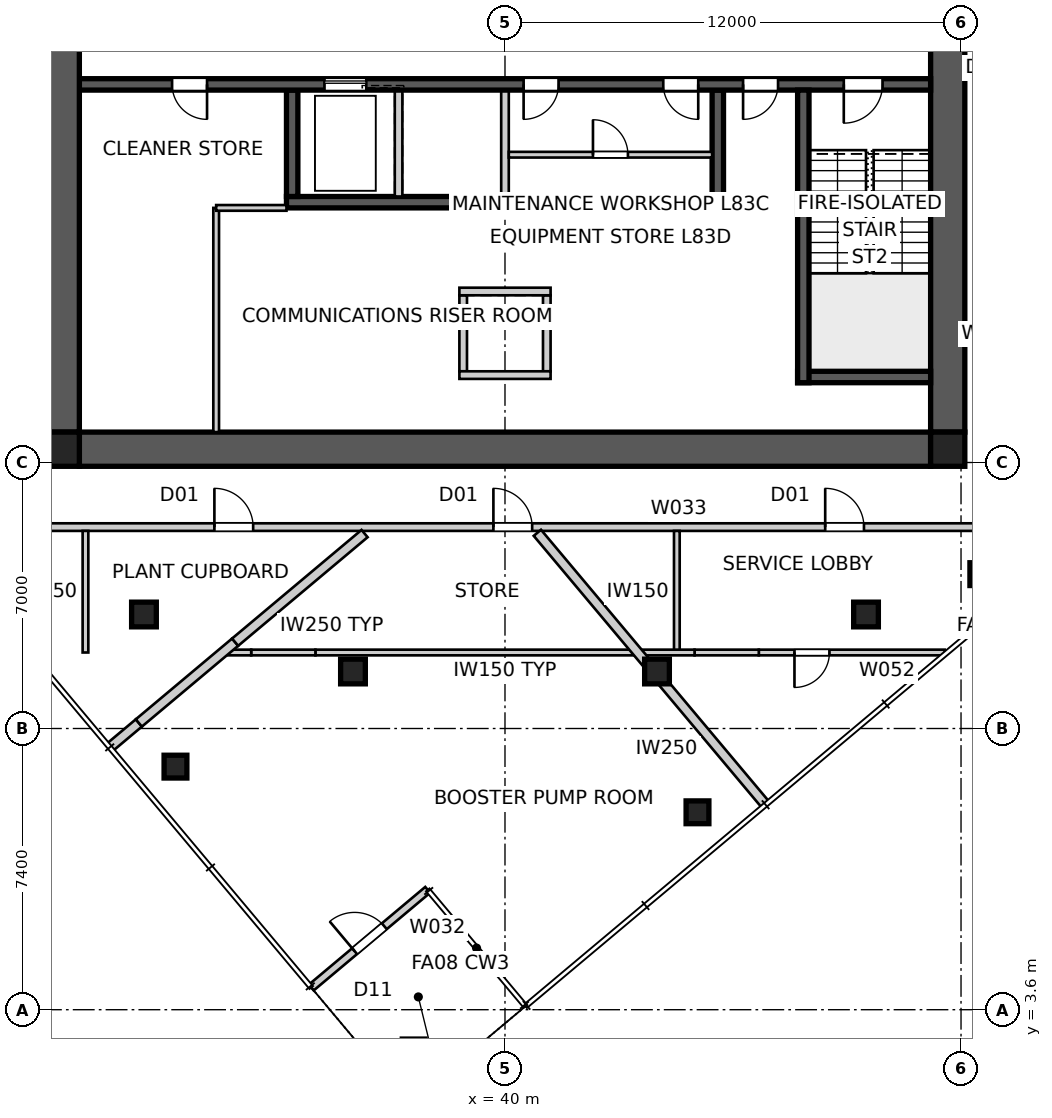
"""IFC4 building model, lengths in metres.
Left out: names, types, materials, properties, quantities, classifications, styles, units other than length and angle.
Written with IfcOpenShell. Run it as: python <this file> out.ifc"""

import sys

from ifc_helpers import new_model, si_unit, direction, frame, frame_2d, origin, origin_2d, place, context, subcontext, project, spatial, polyline, rectangle, outline, extrude, element, fill, save


model = new_model("IFC4")
c1 = context("Model", 3, precision=1e-05, world=origin(), true_north=direction((0.0, 1.0)))
c2 = subcontext(c1, "Body", "Model", "MODEL_VIEW")
j1 = project(units=[si_unit("LENGTHUNIT", "METRE"), si_unit("PLANEANGLEUNIT", "RADIAN")], contexts=[c1])
p1 = place(None, origin())
s1 = spatial("IfcSite", under=j1, at=p1, CompositionType="ELEMENT")
p2 = place(p1, origin())
s2 = spatial("IfcBuilding", under=s1, at=p2, CompositionType="ELEMENT")
p3 = place(p2, frame((0.0, 0.0, 299.8)))
s3 = spatial("IfcBuildingStorey", under=s2, at=p3, CompositionType="ELEMENT", Elevation=299.8)
p4 = place(p3, frame((51.2, 18.35, 0.0), z_axis=(0.0, 0.0, 1.0), x_axis=(-1.0, 0.0, 0.0)))
e1 = element("IfcWall", 1, at=p4, inside=s3, PredefinedType="SHEAR", context=c2, shape_type="SweptSolid", body=[
    extrude(outline(polyline([(0.0, -0.45), (22.4, -0.45), (22.4, -0.025), (22.85, -0.025), (22.85, 0.025), (22.4, 0.025), (22.4, 0.45), (0.0, 0.45), (0.0, 0.025), (-0.45, 0.025), (-0.45, -0.025), (0.0, -0.025), (0.0, -0.45)])), origin(), (0.0, 0.0, 1.0), 4.5),
])
p5 = place(p3, frame((51.65, 18.8, 0.0), z_axis=(0.0, 0.0, 1.0), x_axis=(0.0, 1.0, 0.0)))
e2 = element("IfcWall", 2, at=p5, inside=s3, PredefinedType="SHEAR", context=c2, shape_type="SweptSolid", body=[
    extrude(outline(polyline([(0.0, -0.45), (22.4, -0.45), (22.4, -0.025), (22.85, -0.025), (22.85, 0.025), (22.4, 0.025), (22.4, 0.45), (0.0, 0.45), (0.0, 0.025), (-0.45, 0.025), (-0.45, -0.025), (0.0, -0.025), (0.0, -0.45)])), origin(), (0.0, 0.0, 1.0), 4.5),
])
p6 = place(p5, frame((11.14, 0.0, 0.0)))
e3 = element("IfcOpeningElement", 3, at=p6, cuts=e2, PredefinedType="OPENING", context=c2, shape_type="SweptSolid", body=[
    extrude(rectangle(XDim=1.02, YDim=2.4, at=frame_2d((0.51, 1.2))), frame((0.0, 0.46, 0.0), z_axis=(0.0, -1.0, 0.0), x_axis=(1.0, 0.0, 0.0)), (0.0, 0.0, 1.0), 0.92),
])
p7 = place(p3, frame((28.35, 41.2, 0.0), z_axis=(0.0, 0.0, 1.0), x_axis=(0.0, -1.0, 0.0)))
e4 = element("IfcWall", 4, at=p7, inside=s3, PredefinedType="SHEAR", context=c2, shape_type="SweptSolid", body=[
    extrude(outline(polyline([(0.0, -0.45), (22.4, -0.45), (22.4, -0.025), (22.85, -0.025), (22.85, 0.025), (22.4, 0.025), (22.4, 0.45), (0.0, 0.45), (0.0, 0.025), (-0.45, 0.025), (-0.45, -0.025), (0.0, -0.025), (0.0, -0.45)])), origin(), (0.0, 0.0, 1.0), 4.5),
])
p8 = place(p7, frame((11.14, 0.0, 0.0)))
e5 = element("IfcOpeningElement", 5, at=p8, cuts=e4, PredefinedType="OPENING", context=c2, shape_type="SweptSolid", body=[
    extrude(rectangle(XDim=1.02, YDim=2.4, at=frame_2d((0.51, 1.2))), frame((0.0, 0.46, 0.0), z_axis=(0.0, -1.0, 0.0), x_axis=(1.0, 0.0, 0.0)), (0.0, 0.0, 1.0), 0.92),
])
p9 = place(p3, frame((51.2, 27.95, 0.0), z_axis=(0.0, 0.0, 1.0), x_axis=(-1.0, 0.0, 0.0)))
e6 = element("IfcWall", 6, at=p9, inside=s3, PredefinedType="SHEAR", context=c2, shape_type="SweptSolid", body=[
    extrude(rectangle(XDim=22.4, YDim=0.3, at=frame_2d((11.2, 0.0))), origin(), (0.0, 0.0, 1.0), 4.5),
])
p10 = place(p9, frame((19.04, 0.0, 0.0)))
e7 = element("IfcOpeningElement", 7, at=p10, cuts=e6, PredefinedType="OPENING", context=c2, shape_type="SweptSolid", body=[
    extrude(rectangle(XDim=0.92, YDim=2.1, at=frame_2d((0.46, 1.05))), frame((0.0, 0.16, 0.0), z_axis=(0.0, -1.0, 0.0), x_axis=(1.0, 0.0, 0.0)), (0.0, 0.0, 1.0), 0.32),
])
p11 = place(p9, frame((1.265, 0.0, 0.0)))
e8 = element("IfcOpeningElement", 8, at=p11, cuts=e6, PredefinedType="OPENING", context=c2, shape_type="SweptSolid", body=[
    extrude(rectangle(XDim=1.02, YDim=2.1, at=frame_2d((0.51, 1.05))), frame((0.0, 0.16, 0.0), z_axis=(0.0, -1.0, 0.0), x_axis=(1.0, 0.0, 0.0)), (0.0, 0.0, 1.0), 0.32),
])
p12 = place(p9, frame((4.015, 0.0, 0.0)))
e9 = element("IfcOpeningElement", 9, at=p12, cuts=e6, PredefinedType="OPENING", context=c2, shape_type="SweptSolid", body=[
    extrude(rectangle(XDim=0.92, YDim=2.1, at=frame_2d((0.46, 1.05))), frame((0.0, 0.16, 0.0), z_axis=(0.0, -1.0, 0.0), x_axis=(1.0, 0.0, 0.0)), (0.0, 0.0, 1.0), 0.32),
])
p13 = place(p9, frame((9.79, 0.0, 0.0)))
e10 = element("IfcOpeningElement", 10, at=p13, cuts=e6, PredefinedType="OPENING", context=c2, shape_type="SweptSolid", body=[
    extrude(rectangle(XDim=0.92, YDim=2.1, at=frame_2d((0.46, 1.05))), frame((0.0, 0.16, 0.0), z_axis=(0.0, -1.0, 0.0), x_axis=(1.0, 0.0, 0.0)), (0.0, 0.0, 1.0), 0.32),
])
p14 = place(p9, frame((6.115, 0.0, 0.0)))
e11 = element("IfcOpeningElement", 11, at=p14, cuts=e6, PredefinedType="OPENING", context=c2, shape_type="SweptSolid", body=[
    extrude(rectangle(XDim=0.92, YDim=2.1, at=frame_2d((0.46, 1.05))), frame((0.0, 0.16, 0.0), z_axis=(0.0, -1.0, 0.0), x_axis=(1.0, 0.0, 0.0)), (0.0, 0.0, 1.0), 0.32),
])
p15 = place(p9, frame((14.85, 0.0, 0.0)))
e12 = element("IfcOpeningElement", 12, at=p15, cuts=e6, PredefinedType="OPENING", context=c2, shape_type="SweptSolid", body=[
    extrude(rectangle(XDim=1.1, YDim=2.1, at=frame_2d((0.55, 1.05))), frame((0.0, 0.16, 0.0), z_axis=(0.0, -1.0, 0.0), x_axis=(1.0, 0.0, 0.0)), (0.0, 0.0, 1.0), 0.32),
])
p16 = place(p3, frame((45.75, 24.85, 0.0), z_axis=(0.0, 0.0, 1.0), x_axis=(-1.0, 0.0, 0.0)))
e13 = element("IfcWall", 13, at=p16, inside=s3, PredefinedType="SHEAR", context=c2, shape_type="SweptSolid", body=[
    extrude(rectangle(XDim=11.5, YDim=0.3, at=frame_2d((5.75, 0.0))), origin(), (0.0, 0.0, 1.0), 4.5),
])
p17 = place(p3, frame((45.6, 27.8, 0.0), z_axis=(0.0, 0.0, 1.0), x_axis=(0.0, -1.0, 0.0)))
e14 = element("IfcWall", 14, at=p17, inside=s3, PredefinedType="SHEAR", context=c2, shape_type="SweptSolid", body=[
    extrude(rectangle(XDim=2.8, YDim=0.3, at=frame_2d((1.4, 0.0))), origin(), (0.0, 0.0, 1.0), 4.5),
])
for number, where, z_axis, x_axis in (
    (15, (40.0, 27.8, 0.0), (0.0, 0.0, 1.0), (0.0, -1.0, 0.0)),
    (16, (37.2, 27.8, 0.0), (0.0, 0.0, 1.0), (0.0, -1.0, 0.0)),
):
    element("IfcWall", number, at=place(p3, frame(where, z_axis=z_axis, x_axis=x_axis)), inside=s3, PredefinedType="SOLIDWALL", context=c2, shape_type="SweptSolid", body=[
        extrude(rectangle(XDim=2.8, YDim=0.2, at=frame_2d((1.4, 0.0))), origin(), (0.0, 0.0, 1.0), 4.5),
    ])
p18 = place(p3, frame((34.4, 27.8, 0.0), z_axis=(0.0, 0.0, 1.0), x_axis=(0.0, -1.0, 0.0)))
e17 = element("IfcWall", 17, at=p18, inside=s3, PredefinedType="SHEAR", context=c2, shape_type="SweptSolid", body=[
    extrude(rectangle(XDim=2.8, YDim=0.3, at=frame_2d((1.4, 0.0))), origin(), (0.0, 0.0, 1.0), 4.5),
])
p19 = place(p3, frame((47.85, 27.8, 0.0), z_axis=(0.0, 0.0, 1.0), x_axis=(0.0, -1.0, 0.0)))
e18 = element("IfcWall", 18, at=p19, inside=s3, PredefinedType="SHEAR", context=c2, shape_type="SweptSolid", body=[
    extrude(rectangle(XDim=7.7, YDim=0.3, at=frame_2d((3.85, 0.0))), origin(), (0.0, 0.0, 1.0), 4.5),
])
p20 = place(p3, frame((51.2, 20.25, 0.0), z_axis=(0.0, 0.0, 1.0), x_axis=(-1.0, 0.0, 0.0)))
e19 = element("IfcWall", 19, at=p20, inside=s3, PredefinedType="SHEAR", context=c2, shape_type="SweptSolid", body=[
    extrude(rectangle(XDim=3.5, YDim=0.3, at=frame_2d((1.75, 0.0))), origin(), (0.0, 0.0, 1.0), 4.5),
])
for number, where, z_axis, x_axis in (
    (20, (38.9, 22.4, 0.0), (0.0, 0.0, 1.0), (0.0, -1.0, 0.0)),
    (21, (41.1, 22.4, 0.0), (0.0, 0.0, 1.0), (0.0, -1.0, 0.0)),
):
    element("IfcWall", number, at=place(p3, frame(where, z_axis=z_axis, x_axis=x_axis)), inside=s3, PredefinedType="SOLIDWALL", context=c2, shape_type="SweptSolid", body=[
        extrude(rectangle(XDim=2.0, YDim=0.2, at=frame_2d((1.0, 0.0))), origin(), (0.0, 0.0, 1.0), 4.5),
    ])
for number, where, z_axis, x_axis in (
    (22, (38.8, 22.5, 0.0), (0.0, 0.0, 1.0), (1.0, 0.0, 0.0)),
    (23, (38.8, 20.3, 0.0), (0.0, 0.0, 1.0), (1.0, 0.0, 0.0)),
):
    element("IfcWall", number, at=place(p3, frame(where, z_axis=z_axis, x_axis=x_axis)), inside=s3, PredefinedType="SOLIDWALL", context=c2, shape_type="SweptSolid", body=[
        extrude(rectangle(XDim=2.4, YDim=0.2, at=frame_2d((1.2, 0.0))), origin(), (0.0, 0.0, 1.0), 4.5),
    ])
for number, where, z_axis, x_axis in (
    (24, (28.35, 18.35, 0.0), (0.0, 0.0, 1.0), (1.0, 0.0, 0.0)),
    (25, (51.65, 18.35, 0.0), (0.0, 0.0, 1.0), (1.0, 0.0, 0.0)),
):
    element("IfcColumn", number, at=place(p3, frame(where, z_axis=z_axis, x_axis=x_axis)), inside=s3, PredefinedType="COLUMN", context=c2, shape_type="SweptSolid", body=[
        extrude(rectangle(XDim=0.9, YDim=0.9, at=origin_2d()), origin(), (0.0, 0.0, 1.0), 4.5),
    ])
for number, where, z_axis, x_axis in (
    (26, (45.065, 8.795, 0.0), (0.0, 0.0, 1.0), (1.0, 0.0, 0.0)),
    (27, (52.534, 15.062, 0.0), (0.0, 0.0, 1.0), (1.0, 0.0, 0.0)),
    (28, (31.329, 9.997, 0.0), (0.0, 0.0, 1.0), (1.0, 0.0, 0.0)),
):
    element("IfcColumn", number, at=place(p3, frame(where, z_axis=z_axis, x_axis=x_axis)), inside=s3, PredefinedType="COLUMN", context=c2, shape_type="SweptSolid", body=[
        extrude(rectangle(XDim=0.6, YDim=0.6, at=origin_2d()), origin(), (0.0, 0.0, 1.0), 4.5),
    ])
for number, where, z_axis, x_axis in (
    (29, (30.5, 14.0, 0.0), (0.0, 0.0, 1.0), (1.0, 0.0, 0.0)),
    (30, (36.0, 12.5, 0.0), (0.0, 0.0, 1.0), (1.0, 0.0, 0.0)),
    (31, (44.0, 12.5, 0.0), (0.0, 0.0, 1.0), (1.0, 0.0, 0.0)),
    (32, (49.5, 14.0, 0.0), (0.0, 0.0, 1.0), (1.0, 0.0, 0.0)),
):
    element("IfcColumn", number, at=place(p3, frame(where, z_axis=z_axis, x_axis=x_axis)), inside=s3, PredefinedType="COLUMN", context=c2, shape_type="SweptSolid", body=[
        extrude(rectangle(XDim=0.65, YDim=0.65, at=origin_2d()), origin(), (0.0, 0.0, 1.0), 4.5),
    ])
p21 = place(p3, frame((34.902, 4.183, 0.0), z_axis=(0.0, 0.0, 1.0), x_axis=(0.766060656284, 0.642768287094, 0.0)))
e33 = element("IfcWall", 33, at=p21, inside=s3, PredefinedType="SOLIDWALL", context=c2, shape_type="SweptSolid", body=[
    extrude(rectangle(XDim=4.0, YDim=0.2, at=frame_2d((2.0, 0.0))), origin(), (0.0, 0.0, 1.0), 4.3),
])
p22 = place(p21, frame((1.49, 0.0, 0.0)))
e34 = element("IfcOpeningElement", 34, at=p22, cuts=e33, PredefinedType="OPENING", context=c2, shape_type="SweptSolid", body=[
    extrude(rectangle(XDim=1.02, YDim=2.1, at=frame_2d((0.51, 1.05))), frame((0.0, 0.11, 0.0), z_axis=(0.0, -1.0, 0.0), x_axis=(1.0, 0.0, 0.0)), (0.0, 0.0, 1.0), 0.22),
])
p23 = place(p3, frame((26.3, 16.3, 0.0), z_axis=(0.0, 0.0, 1.0), x_axis=(1.0, 0.0, 0.0)))
e35 = element("IfcWall", 35, at=p23, inside=s3, PredefinedType="PARTITIONING", context=c2, shape_type="SweptSolid", body=[
    extrude(rectangle(XDim=27.4, YDim=0.2, at=frame_2d((13.7, 0.0))), origin(), (0.0, 0.0, 1.0), 4.3),
])
p24 = place(p23, frame((22.126, 0.0, 0.0)))
e36 = element("IfcOpeningElement", 36, at=p24, cuts=e35, PredefinedType="OPENING", context=c2, shape_type="SweptSolid", body=[
    extrude(rectangle(XDim=1.02, YDim=2.34, at=frame_2d((0.51, 1.17))), frame((0.0, 0.11, 0.0), z_axis=(0.0, -1.0, 0.0), x_axis=(1.0, 0.0, 0.0)), (0.0, 0.0, 1.0), 0.22),
])
p25 = place(p23, frame((13.395, 0.0, 0.0)))
e37 = element("IfcOpeningElement", 37, at=p25, cuts=e35, PredefinedType="OPENING", context=c2, shape_type="SweptSolid", body=[
    extrude(rectangle(XDim=1.02, YDim=2.34, at=frame_2d((0.51, 1.17))), frame((0.0, 0.11, 0.0), z_axis=(0.0, -1.0, 0.0), x_axis=(1.0, 0.0, 0.0)), (0.0, 0.0, 1.0), 0.22),
])
p26 = place(p23, frame((6.053, 0.0, 0.0)))
e38 = element("IfcOpeningElement", 38, at=p26, cuts=e35, PredefinedType="OPENING", context=c2, shape_type="SweptSolid", body=[
    extrude(rectangle(XDim=1.02, YDim=2.34, at=frame_2d((0.51, 1.17))), frame((0.0, 0.11, 0.0), z_axis=(0.0, -1.0, 0.0), x_axis=(1.0, 0.0, 0.0)), (0.0, 0.0, 1.0), 0.22),
])
p27 = place(p3, frame((46.857, 8.993, 0.0), z_axis=(0.0, 0.0, 1.0), x_axis=(-0.64278692291, 0.766045019392, 0.0)))
e39 = element("IfcWall", 39, at=p27, inside=s3, PredefinedType="PARTITIONING", context=c2, shape_type="SweptSolid", body=[
    extrude(rectangle(XDim=9.343, YDim=0.25, at=frame_2d((4.671, 0.0))), origin(), (0.0, 0.0, 1.0), 4.3),
])
p28 = place(p3, frame((29.599, 10.503, 0.0), z_axis=(0.0, 0.0, 1.0), x_axis=(0.766055819685, 0.64277405138, 0.0)))
e40 = element("IfcWall", 40, at=p28, inside=s3, PredefinedType="PARTITIONING", context=c2, shape_type="SweptSolid", body=[
    extrude(rectangle(XDim=1.0, YDim=0.25, at=frame_2d((0.5, 0.0))), origin(), (0.0, 0.0, 1.0), 4.3),
])
p29 = place(p3, frame((30.365, 11.146, 0.0), z_axis=(0.0, 0.0, 1.0), x_axis=(0.766014492995, 0.642823301165, 0.0)))
e41 = element("IfcWall", 41, at=p29, inside=s3, PredefinedType="PARTITIONING", context=c2, shape_type="SweptSolid", body=[
    extrude(rectangle(XDim=3.308, YDim=0.25, at=frame_2d((1.654, 0.0))), origin(), (0.0, 0.0, 1.0), 3.688),
])
p30 = place(p3, frame((32.899, 13.272, 0.0), z_axis=(0.0, 0.0, 1.0), x_axis=(0.766051985436, 0.642778620996, 0.0)))
e42 = element("IfcWall", 42, at=p30, inside=s3, PredefinedType="PARTITIONING", context=c2, shape_type="SweptSolid", body=[
    extrude(rectangle(XDim=4.446, YDim=0.25, at=frame_2d((2.223, 0.0))), origin(), (0.0, 0.0, 1.0), 4.3),
])
p31 = place(p3, frame((32.4, 18.8, 0.0), z_axis=(0.0, 0.0, 1.0), x_axis=(0.0, 1.0, 0.0)))
e43 = element("IfcWall", 43, at=p31, inside=s3, PredefinedType="SOLIDWALL", context=c2, shape_type="SweptSolid", body=[
    extrude(rectangle(XDim=5.9, YDim=0.15, at=frame_2d((2.95, 0.0))), origin(), (0.0, 0.0, 1.0), 4.3),
])
p32 = place(p3, frame((32.4, 24.7, 0.0), z_axis=(0.0, 0.0, 1.0), x_axis=(1.0, 0.0, 0.0)))
e44 = element("IfcWall", 44, at=p32, inside=s3, PredefinedType="SOLIDWALL", context=c2, shape_type="SweptSolid", body=[
    extrude(rectangle(XDim=1.85, YDim=0.15, at=frame_2d((0.925, 0.0))), origin(), (0.0, 0.0, 1.0), 4.3),
])
for number, where, z_axis, x_axis in (
    (45, (28.961, 16.2, 0.0), (0.0, 0.0, 1.0), (0.0, -1.0, 0.0)),
    (46, (44.522, 13.0, 0.0), (0.0, 0.0, 1.0), (0.0, 1.0, 0.0)),
):
    element("IfcWall", number, at=place(p3, frame(where, z_axis=z_axis, x_axis=x_axis)), inside=s3, PredefinedType="SOLIDWALL", context=c2, shape_type="SweptSolid", body=[
        extrude(rectangle(XDim=3.2, YDim=0.15, at=frame_2d((1.6, 0.0))), origin(), (0.0, 0.0, 1.0), 4.3),
    ])
p33 = place(p3, frame((51.57, 13.0, 0.0), z_axis=(0.0, 0.0, 1.0), x_axis=(-1.0, 0.0, 0.0)))
e47 = element("IfcWall", 47, at=p33, inside=s3, PredefinedType="SOLIDWALL", context=c2, shape_type="SweptSolid", body=[
    extrude(rectangle(XDim=4.892, YDim=0.15, at=frame_2d((2.446, 0.0))), origin(), (0.0, 0.0, 1.0), 4.3),
])
p34 = place(p33, frame((3.033, 0.0, 0.0)))
e48 = element("IfcOpeningElement", 48, at=p34, cuts=e47, PredefinedType="OPENING", context=c2, shape_type="SweptSolid", body=[
    extrude(rectangle(XDim=0.92, YDim=2.1, at=frame_2d((0.46, 1.05))), frame((0.0, 0.085, 0.0), z_axis=(0.0, -1.0, 0.0), x_axis=(1.0, 0.0, 0.0)), (0.0, 0.0, 1.0), 0.17),
])
p35 = place(p3, frame((46.678, 13.0, 0.0), z_axis=(0.0, 0.0, 1.0), x_axis=(-1.0, 0.0, 0.0)))
e49 = element("IfcWall", 49, at=p35, inside=s3, PredefinedType="SOLIDWALL", context=c2, shape_type="SweptSolid", body=[
    extrude(rectangle(XDim=1.69, YDim=0.15, at=frame_2d((0.845, 0.0))), origin(), (0.0, 0.0, 1.0), 3.3),
])
p36 = place(p3, frame((44.988, 13.0, 0.0), z_axis=(0.0, 0.0, 1.0), x_axis=(-1.0, 0.0, 0.0)))
e50 = element("IfcWall", 50, at=p36, inside=s3, PredefinedType="SOLIDWALL", context=c2, shape_type="SweptSolid", body=[
    extrude(rectangle(XDim=9.977, YDim=0.15, at=frame_2d((4.988, 0.0))), origin(), (0.0, 0.0, 1.0), 4.3),
])
p37 = place(p3, frame((35.012, 13.0, 0.0), z_axis=(0.0, 0.0, 1.0), x_axis=(-1.0, 0.0, 0.0)))
e51 = element("IfcWall", 51, at=p37, inside=s3, PredefinedType="SOLIDWALL", context=c2, shape_type="SweptSolid", body=[
    extrude(rectangle(XDim=1.69, YDim=0.15, at=frame_2d((0.845, 0.0))), origin(), (0.0, 0.0, 1.0), 3.3),
])
p38 = place(p3, frame((33.322, 13.0, 0.0), z_axis=(0.0, 0.0, 1.0), x_axis=(-1.0, 0.0, 0.0)))
e52 = element("IfcWall", 52, at=p38, inside=s3, PredefinedType="SOLIDWALL", context=c2, shape_type="SweptSolid", body=[
    extrude(rectangle(XDim=0.747, YDim=0.15, at=frame_2d((0.373, 0.0))), origin(), (0.0, 0.0, 1.0), 4.3),
])
p39 = place(p3, frame((40.1, 26.1, 0.0), z_axis=(0.0, 0.0, 1.0), x_axis=(1.0, 0.0, 0.0)))
e53 = element("IfcWall", 53, at=p39, inside=s3, PredefinedType="SOLIDWALL", context=c2, shape_type="SweptSolid", body=[
    extrude(rectangle(XDim=5.35, YDim=0.15, at=frame_2d((2.675, 0.0))), origin(), (0.0, 0.0, 1.0), 4.3),
])
p40 = place(p39, frame((2.215, 0.0, 0.0)))
e54 = element("IfcOpeningElement", 54, at=p40, cuts=e53, PredefinedType="OPENING", context=c2, shape_type="SweptSolid", body=[
    extrude(rectangle(XDim=0.92, YDim=2.1, at=frame_2d((0.46, 1.05))), frame((0.0, 0.085, 0.0), z_axis=(0.0, -1.0, 0.0), x_axis=(1.0, 0.0, 0.0)), (0.0, 0.0, 1.0), 0.17),
])
p41 = place(p22, origin())
e55 = element("IfcDoor", 55, at=p41, inside=s3, OperationType="SINGLE_SWING_LEFT", PredefinedType="DOOR", context=c2, shape_type="SweptSolid", body=[
    extrude(rectangle(XDim=1.02, YDim=2.1, at=frame_2d((0.51, 1.05))), frame((0.0, 0.025, 0.0), z_axis=(0.0, -1.0, 0.0), x_axis=(1.0, 0.0, 0.0)), (0.0, 0.0, 1.0), 0.05),
])
fill(e34, e55)
p42 = place(p10, origin())
e56 = element("IfcDoor", 56, at=p42, inside=s3, OperationType="SINGLE_SWING_LEFT", PredefinedType="DOOR", context=c2, shape_type="SweptSolid", body=[
    extrude(rectangle(XDim=0.92, YDim=2.1, at=frame_2d((0.46, 1.05))), frame((0.0, 0.025, 0.0), z_axis=(0.0, -1.0, 0.0), x_axis=(1.0, 0.0, 0.0)), (0.0, 0.0, 1.0), 0.05),
])
fill(e7, e56)
p43 = place(p11, origin())
e57 = element("IfcDoor", 57, at=p43, inside=s3, OperationType="SINGLE_SWING_RIGHT", PredefinedType="DOOR", context=c2, shape_type="SweptSolid", body=[
    extrude(rectangle(XDim=1.02, YDim=2.1, at=frame_2d((0.51, 1.05))), frame((0.0, 0.025, 0.0), z_axis=(0.0, -1.0, 0.0), x_axis=(1.0, 0.0, 0.0)), (0.0, 0.0, 1.0), 0.05),
])
fill(e8, e57)
p44 = place(p12, origin())
e58 = element("IfcDoor", 58, at=p44, inside=s3, OperationType="SINGLE_SWING_RIGHT", PredefinedType="DOOR", context=c2, shape_type="SweptSolid", body=[
    extrude(rectangle(XDim=0.92, YDim=2.1, at=frame_2d((0.46, 1.05))), frame((0.0, 0.025, 0.0), z_axis=(0.0, -1.0, 0.0), x_axis=(1.0, 0.0, 0.0)), (0.0, 0.0, 1.0), 0.05),
])
fill(e9, e58)
p45 = place(p24, origin())
e59 = element("IfcDoor", 59, at=p45, inside=s3, OperationType="SINGLE_SWING_LEFT", PredefinedType="DOOR", context=c2, shape_type="SweptSolid", body=[
    extrude(rectangle(XDim=1.02, YDim=2.34, at=frame_2d((0.51, 1.17))), frame((0.0, 0.025, 0.0), z_axis=(0.0, -1.0, 0.0), x_axis=(1.0, 0.0, 0.0)), (0.0, 0.0, 1.0), 0.05),
])
fill(e36, e59)
p46 = place(p25, origin())
e60 = element("IfcDoor", 60, at=p46, inside=s3, OperationType="SINGLE_SWING_LEFT", PredefinedType="DOOR", context=c2, shape_type="SweptSolid", body=[
    extrude(rectangle(XDim=1.02, YDim=2.34, at=frame_2d((0.51, 1.17))), frame((0.0, 0.025, 0.0), z_axis=(0.0, -1.0, 0.0), x_axis=(1.0, 0.0, 0.0)), (0.0, 0.0, 1.0), 0.05),
])
fill(e37, e60)
p47 = place(p26, origin())
e61 = element("IfcDoor", 61, at=p47, inside=s3, OperationType="SINGLE_SWING_LEFT", PredefinedType="DOOR", context=c2, shape_type="SweptSolid", body=[
    extrude(rectangle(XDim=1.02, YDim=2.34, at=frame_2d((0.51, 1.17))), frame((0.0, 0.025, 0.0), z_axis=(0.0, -1.0, 0.0), x_axis=(1.0, 0.0, 0.0)), (0.0, 0.0, 1.0), 0.05),
])
fill(e38, e61)
p48 = place(p34, origin())
e62 = element("IfcDoor", 62, at=p48, inside=s3, OperationType="SINGLE_SWING_RIGHT", PredefinedType="DOOR", context=c2, shape_type="SweptSolid", body=[
    extrude(rectangle(XDim=0.92, YDim=2.1, at=frame_2d((0.46, 1.05))), frame((0.0, 0.025, 0.0), z_axis=(0.0, -1.0, 0.0), x_axis=(1.0, 0.0, 0.0)), (0.0, 0.0, 1.0), 0.05),
])
fill(e48, e62)
p49 = place(p13, origin())
e63 = element("IfcDoor", 63, at=p49, inside=s3, OperationType="SINGLE_SWING_RIGHT", PredefinedType="DOOR", context=c2, shape_type="SweptSolid", body=[
    extrude(rectangle(XDim=0.92, YDim=2.1, at=frame_2d((0.46, 1.05))), frame((0.0, 0.025, 0.0), z_axis=(0.0, -1.0, 0.0), x_axis=(1.0, 0.0, 0.0)), (0.0, 0.0, 1.0), 0.05),
])
fill(e10, e63)
p50 = place(p14, origin())
e64 = element("IfcDoor", 64, at=p50, inside=s3, OperationType="SINGLE_SWING_LEFT", PredefinedType="DOOR", context=c2, shape_type="SweptSolid", body=[
    extrude(rectangle(XDim=0.92, YDim=2.1, at=frame_2d((0.46, 1.05))), frame((0.0, 0.025, 0.0), z_axis=(0.0, -1.0, 0.0), x_axis=(1.0, 0.0, 0.0)), (0.0, 0.0, 1.0), 0.05),
])
fill(e11, e64)
p51 = place(p40, origin())
e65 = element("IfcDoor", 65, at=p51, inside=s3, OperationType="SINGLE_SWING_LEFT", PredefinedType="DOOR", context=c2, shape_type="SweptSolid", body=[
    extrude(rectangle(XDim=0.92, YDim=2.1, at=frame_2d((0.46, 1.05))), frame((0.0, 0.025, 0.0), z_axis=(0.0, -1.0, 0.0), x_axis=(1.0, 0.0, 0.0)), (0.0, 0.0, 1.0), 0.05),
])
fill(e54, e65)
p52 = place(p15, origin())
e66 = element("IfcDoor", 66, at=p52, inside=s3, OperationType="SLIDING_TO_LEFT", PredefinedType="DOOR", context=c2, shape_type="SweptSolid", body=[
    extrude(rectangle(XDim=1.1, YDim=2.1, at=frame_2d((0.55, 1.05))), frame((0.0, 0.025, 0.0), z_axis=(0.0, -1.0, 0.0), x_axis=(1.0, 0.0, 0.0)), (0.0, 0.0, 1.0), 0.05),
])
fill(e12, e66)
save(model, sys.argv[1])
